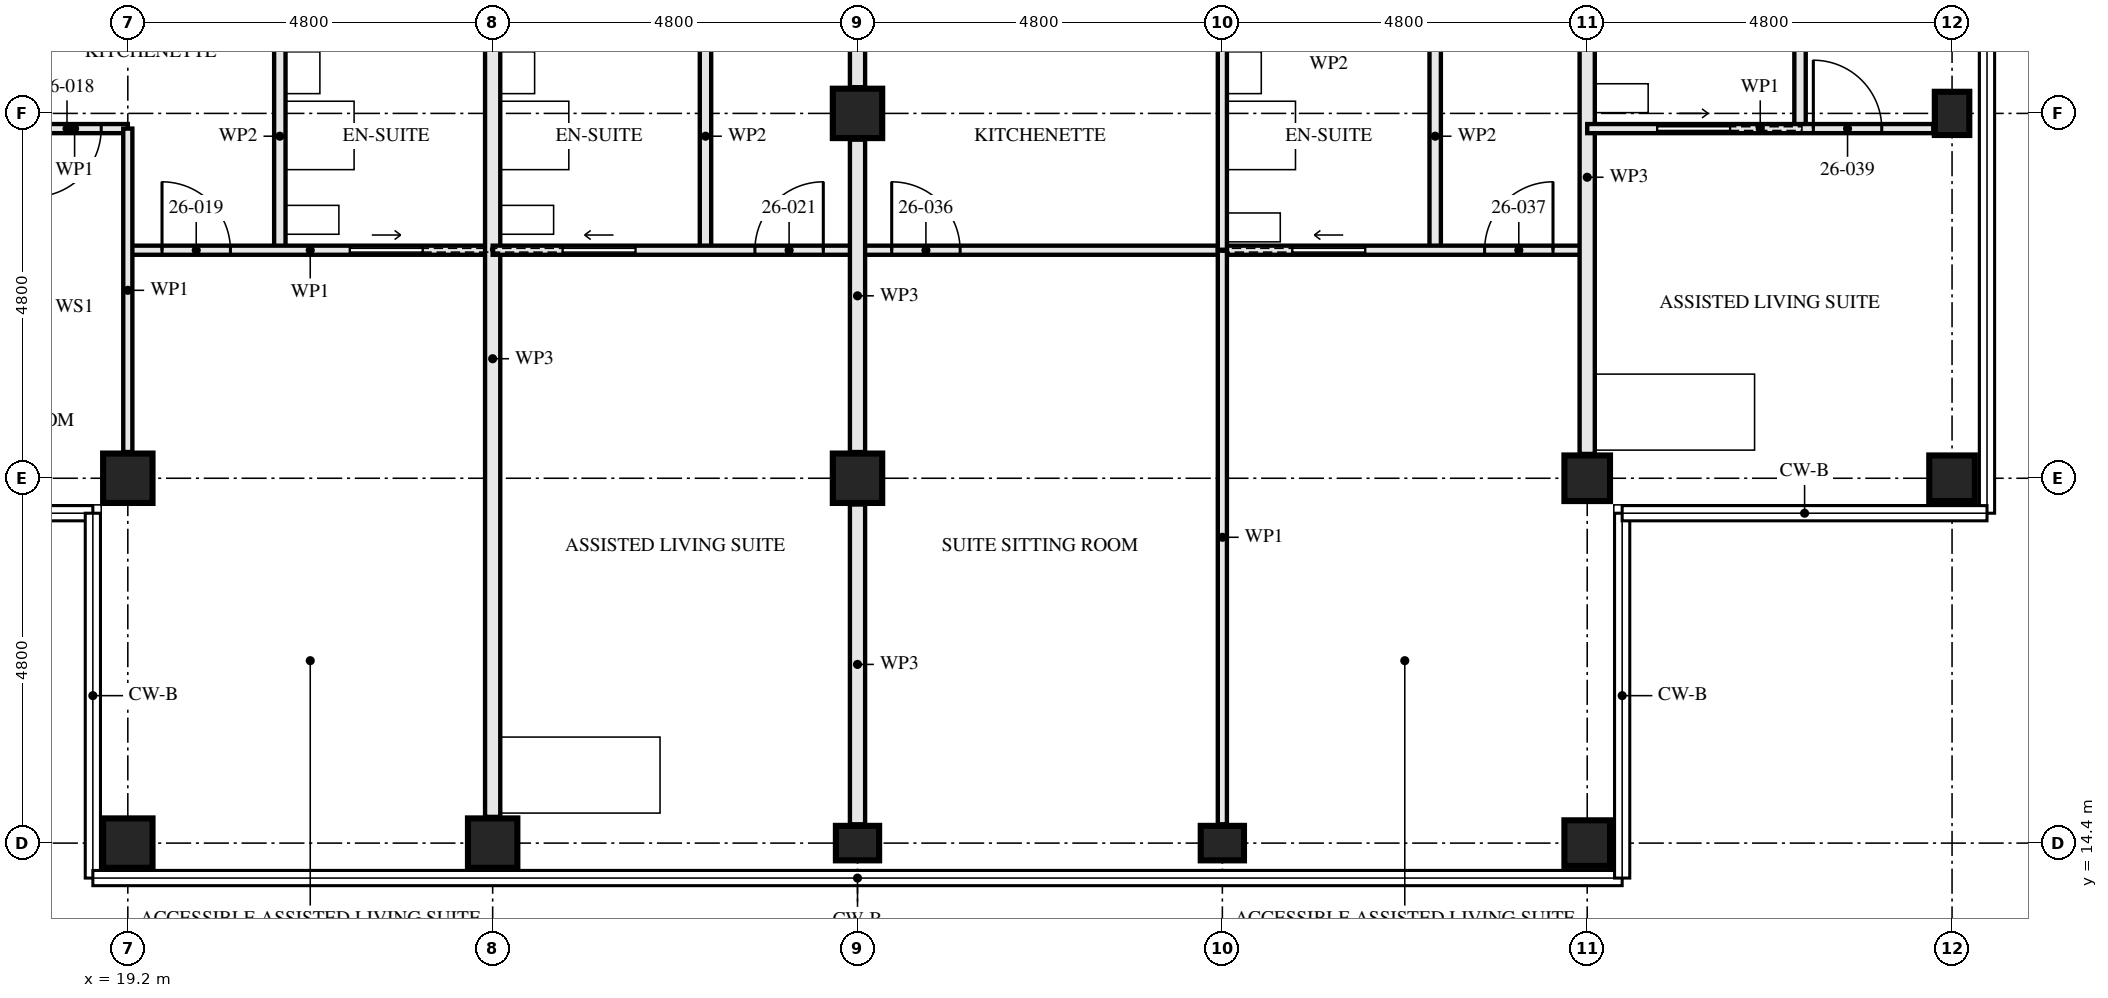
"""IFC4 building model, lengths in metres.
Left out: names, types, materials, properties, quantities, classifications, styles, units other than length and angle.
Written with IfcOpenShell. Run it as: python <this file> out.ifc"""

import sys

from ifc_helpers import new_model, si_unit, direction, frame, frame_2d, origin, origin_2d, place, context, subcontext, project, spatial, rectangle, hollow_rectangle, i_section, extrude, element, fill, save


model = new_model("IFC4")
c1 = context("Model", 3, precision=1e-05, world=origin(), true_north=direction((0.0, 1.0)))
c2 = subcontext(c1, "Body", "Model", "MODEL_VIEW")
j1 = project(units=[si_unit("LENGTHUNIT", "METRE"), si_unit("PLANEANGLEUNIT", "RADIAN")], contexts=[c1])
p1 = place(None, origin())
s1 = spatial("IfcSite", under=j1, at=p1, CompositionType="ELEMENT")
p2 = place(p1, origin())
s2 = spatial("IfcBuilding", under=s1, at=p2, CompositionType="ELEMENT")
p3 = place(p2, frame((0.0, 0.0, 98.0)))
s3 = spatial("IfcBuildingStorey", under=s2, at=p3, CompositionType="ELEMENT", Elevation=98.0)
for number, where, z_axis, x_axis in (
    (1, (19.2, 14.4, 0.0), (0.0, 0.0, 1.0), (0.0, 1.0, 0.0)),
    (2, (19.2, 19.2, 0.0), (0.0, 0.0, 1.0), (0.0, 1.0, 0.0)),
    (3, (24.0, 14.4, 0.0), (0.0, 0.0, 1.0), (0.0, 1.0, 0.0)),
):
    element("IfcColumn", number, at=place(p3, frame(where, z_axis=z_axis, x_axis=x_axis)), inside=s3, PredefinedType="COLUMN", context=c2, shape_type="SweptSolid", body=[
        extrude(hollow_rectangle(XDim=0.65, YDim=0.65, WallThickness=0.08, at=origin_2d()), origin(), (0.0, 0.0, 1.0), 3.5),
    ])
p4 = place(p3, frame((28.8, 14.4, 0.0), z_axis=(0.0, 0.0, 1.0), x_axis=(0.0, 1.0, 0.0)))
e4 = element("IfcColumn", 4, at=p4, inside=s3, PredefinedType="COLUMN", context=c2, shape_type="SweptSolid", body=[
    extrude(i_section(OverallWidth=0.454, OverallDepth=0.569, WebThickness=0.078, FlangeThickness=0.125, FilletRadius=0.015, at=origin_2d()), origin(), (0.0, 0.0, 1.0), 3.5),
])
for number, where, z_axis, x_axis in (
    (5, (28.8, 19.2, 0.0), (0.0, 0.0, 1.0), (1.0, 0.0, 0.0)),
    (6, (28.8, 24.0, 0.0), (0.0, 0.0, 1.0), (1.0, 0.0, 0.0)),
):
    element("IfcColumn", number, at=place(p3, frame(where, z_axis=z_axis, x_axis=x_axis)), inside=s3, PredefinedType="COLUMN", context=c2, shape_type="SweptSolid", body=[
        extrude(hollow_rectangle(XDim=0.65, YDim=0.65, WallThickness=0.05, at=origin_2d()), origin(), (0.0, 0.0, 1.0), 3.5),
    ])
p5 = place(p3, frame((33.6, 14.4, 0.0), z_axis=(0.0, 0.0, 1.0), x_axis=(0.0, 1.0, 0.0)))
e7 = element("IfcColumn", 7, at=p5, inside=s3, PredefinedType="COLUMN", context=c2, shape_type="SweptSolid", body=[
    extrude(i_section(OverallWidth=0.454, OverallDepth=0.569, WebThickness=0.078, FlangeThickness=0.125, FilletRadius=0.015, at=origin_2d()), origin(), (0.0, 0.0, 1.0), 3.5),
])
for number, where, z_axis, x_axis in (
    (8, (38.4, 14.4, 0.0), (0.0, 0.0, 1.0), (0.0, 1.0, 0.0)),
    (9, (38.4, 19.2, 0.0), (0.0, 0.0, 1.0), (0.0, 1.0, 0.0)),
    (10, (43.2, 19.2, 0.0), (0.0, 0.0, 1.0), (0.0, 1.0, 0.0)),
):
    element("IfcColumn", number, at=place(p3, frame(where, z_axis=z_axis, x_axis=x_axis)), inside=s3, PredefinedType="COLUMN", context=c2, shape_type="SweptSolid", body=[
        extrude(hollow_rectangle(XDim=0.6, YDim=0.6, WallThickness=0.05, at=origin_2d()), origin(), (0.0, 0.0, 1.0), 3.5),
    ])
p6 = place(p3, frame((43.2, 24.0, 0.0), z_axis=(0.0, 0.0, 1.0), x_axis=(1.0, 0.0, 0.0)))
e11 = element("IfcColumn", 11, at=p6, inside=s3, PredefinedType="COLUMN", context=c2, shape_type="SweptSolid", body=[
    extrude(i_section(OverallWidth=0.454, OverallDepth=0.569, WebThickness=0.078, FlangeThickness=0.125, FilletRadius=0.015, at=origin_2d()), origin(), (0.0, 0.0, 1.0), 3.5),
])
p7 = place(p3, frame((21.2, 22.2, 0.0), z_axis=(0.0, 0.0, 1.0), x_axis=(0.0, 1.0, 0.0)))
e12 = element("IfcWall", 12, at=p7, inside=s3, PredefinedType="PARTITIONING", context=c2, shape_type="SweptSolid", body=[
    extrude(rectangle(XDim=3.0, YDim=0.15, at=frame_2d((1.5, 0.0))), origin(), (0.0, 0.0, 1.0), 2.55),
])
p8 = place(p3, frame((17.8, 23.8, 0.0), z_axis=(0.0, 0.0, 1.0), x_axis=(1.0, 0.0, 0.0)))
e13 = element("IfcWall", 13, at=p8, inside=s3, PredefinedType="PARTITIONING", context=c2, shape_type="SweptSolid", body=[
    extrude(rectangle(XDim=1.4, YDim=0.12, at=frame_2d((0.7, 0.0))), origin(), (0.0, 0.0, 1.0), 3.33),
])
p9 = place(p8, frame((0.15, 0.0, 0.0)))
e14 = element("IfcOpeningElement", 14, at=p9, cuts=e13, PredefinedType="OPENING", context=c2, shape_type="SweptSolid", body=[
    extrude(rectangle(XDim=0.9, YDim=2.1, at=frame_2d((0.45, 1.05))), frame((0.0, 0.071, 0.0), z_axis=(0.0, -1.0, 0.0), x_axis=(1.0, 0.0, 0.0)), (0.0, 0.0, 1.0), 0.141),
])
p10 = place(p3, frame((19.2, 22.2, 0.0), z_axis=(0.0, 0.0, 1.0), x_axis=(1.0, 0.0, 0.0)))
e15 = element("IfcWall", 15, at=p10, inside=s3, PredefinedType="PARTITIONING", context=c2, shape_type="SweptSolid", body=[
    extrude(rectangle(XDim=4.8, YDim=0.12, at=frame_2d((2.4, 0.0))), origin(), (0.0, 0.0, 1.0), 3.33),
])
p11 = place(p10, frame((0.45, 0.0, 0.0)))
e16 = element("IfcOpeningElement", 16, at=p11, cuts=e15, PredefinedType="OPENING", context=c2, shape_type="SweptSolid", body=[
    extrude(rectangle(XDim=0.9, YDim=2.1, at=frame_2d((0.45, 1.05))), frame((0.0, 0.071, 0.0), z_axis=(0.0, -1.0, 0.0), x_axis=(1.0, 0.0, 0.0)), (0.0, 0.0, 1.0), 0.141),
])
p12 = place(p10, frame((2.925, 0.0, 0.0)))
e17 = element("IfcOpeningElement", 17, at=p12, cuts=e15, PredefinedType="OPENING", context=c2, shape_type="SweptSolid", body=[
    extrude(rectangle(XDim=0.95, YDim=2.1, at=frame_2d((0.475, 1.05))), frame((0.0, 0.071, 0.0), z_axis=(0.0, -1.0, 0.0), x_axis=(1.0, 0.0, 0.0)), (0.0, 0.0, 1.0), 0.141),
])
p13 = place(p3, frame((19.2, 19.545, 0.0), z_axis=(0.0, 0.0, 1.0), x_axis=(0.0, 1.0, 0.0)))
e18 = element("IfcWall", 18, at=p13, inside=s3, PredefinedType="PARTITIONING", context=c2, shape_type="SweptSolid", body=[
    extrude(rectangle(XDim=4.255, YDim=0.12, at=frame_2d((2.127, 0.0))), origin(), (0.0, 0.0, 1.0), 2.55),
])
p14 = place(p3, frame((24.0, 14.745, 0.0), z_axis=(0.0, 0.0, 1.0), x_axis=(0.0, 1.0, 0.0)))
e19 = element("IfcWall", 19, at=p14, inside=s3, PredefinedType="PARTITIONING", context=c2, shape_type="SweptSolid", body=[
    extrude(rectangle(XDim=12.055, YDim=0.2, at=frame_2d((6.027, 0.0))), origin(), (0.0, 0.0, 1.0), 2.55),
])
p15 = place(p3, frame((26.8, 22.2, 0.0), z_axis=(0.0, 0.0, 1.0), x_axis=(0.0, 1.0, 0.0)))
e20 = element("IfcWall", 20, at=p15, inside=s3, PredefinedType="PARTITIONING", context=c2, shape_type="SweptSolid", body=[
    extrude(rectangle(XDim=3.0, YDim=0.15, at=frame_2d((1.5, 0.0))), origin(), (0.0, 0.0, 1.0), 2.55),
])
p16 = place(p3, frame((24.0, 22.2, 0.0), z_axis=(0.0, 0.0, 1.0), x_axis=(1.0, 0.0, 0.0)))
e21 = element("IfcWall", 21, at=p16, inside=s3, PredefinedType="PARTITIONING", context=c2, shape_type="SweptSolid", body=[
    extrude(rectangle(XDim=4.8, YDim=0.12, at=frame_2d((2.4, 0.0))), origin(), (0.0, 0.0, 1.0), 3.33),
])
p17 = place(p16, frame((3.45, 0.0, 0.0)))
e22 = element("IfcOpeningElement", 22, at=p17, cuts=e21, PredefinedType="OPENING", context=c2, shape_type="SweptSolid", body=[
    extrude(rectangle(XDim=0.9, YDim=2.1, at=frame_2d((0.45, 1.05))), frame((0.0, 0.071, 0.0), z_axis=(0.0, -1.0, 0.0), x_axis=(1.0, 0.0, 0.0)), (0.0, 0.0, 1.0), 0.141),
])
p18 = place(p16, frame((0.925, 0.0, 0.0)))
e23 = element("IfcOpeningElement", 23, at=p18, cuts=e21, PredefinedType="OPENING", context=c2, shape_type="SweptSolid", body=[
    extrude(rectangle(XDim=0.95, YDim=2.1, at=frame_2d((0.475, 1.05))), frame((0.0, 0.071, 0.0), z_axis=(0.0, -1.0, 0.0), x_axis=(1.0, 0.0, 0.0)), (0.0, 0.0, 1.0), 0.141),
])
p19 = place(p3, frame((36.4, 22.2, 0.0), z_axis=(0.0, 0.0, 1.0), x_axis=(0.0, 1.0, 0.0)))
e24 = element("IfcWall", 24, at=p19, inside=s3, PredefinedType="PARTITIONING", context=c2, shape_type="SweptSolid", body=[
    extrude(rectangle(XDim=3.0, YDim=0.15, at=frame_2d((1.5, 0.0))), origin(), (0.0, 0.0, 1.0), 2.55),
])
p20 = place(p3, frame((33.6, 22.2, 0.0), z_axis=(0.0, 0.0, 1.0), x_axis=(0.0, 1.0, 0.0)))
e25 = element("IfcWall", 25, at=p20, inside=s3, PredefinedType="PARTITIONING", context=c2, shape_type="SweptSolid", body=[
    extrude(rectangle(XDim=4.65, YDim=0.12, at=frame_2d((2.325, 0.0))), origin(), (0.0, 0.0, 1.0), 2.55),
])
p21 = place(p20, frame((3.35, 0.0, 0.0)))
e26 = element("IfcOpeningElement", 26, at=p21, cuts=e25, PredefinedType="OPENING", context=c2, shape_type="SweptSolid", body=[
    extrude(rectangle(XDim=0.9, YDim=2.1, at=frame_2d((0.45, 1.05))), frame((0.0, 0.071, 0.0), z_axis=(0.0, -1.0, 0.0), x_axis=(1.0, 0.0, 0.0)), (0.0, 0.0, 1.0), 0.141),
])
p22 = place(p3, frame((28.8, 22.2, 0.0), z_axis=(0.0, 0.0, 1.0), x_axis=(1.0, 0.0, 0.0)))
e27 = element("IfcWall", 27, at=p22, inside=s3, PredefinedType="PARTITIONING", context=c2, shape_type="SweptSolid", body=[
    extrude(rectangle(XDim=4.8, YDim=0.12, at=frame_2d((2.4, 0.0))), origin(), (0.0, 0.0, 1.0), 3.33),
])
p23 = place(p22, frame((0.45, 0.0, 0.0)))
e28 = element("IfcOpeningElement", 28, at=p23, cuts=e27, PredefinedType="OPENING", context=c2, shape_type="SweptSolid", body=[
    extrude(rectangle(XDim=0.9, YDim=2.1, at=frame_2d((0.45, 1.05))), frame((0.0, 0.071, 0.0), z_axis=(0.0, -1.0, 0.0), x_axis=(1.0, 0.0, 0.0)), (0.0, 0.0, 1.0), 0.141),
])
p24 = place(p3, frame((33.6, 22.2, 0.0), z_axis=(0.0, 0.0, 1.0), x_axis=(1.0, 0.0, 0.0)))
e29 = element("IfcWall", 29, at=p24, inside=s3, PredefinedType="PARTITIONING", context=c2, shape_type="SweptSolid", body=[
    extrude(rectangle(XDim=4.8, YDim=0.12, at=frame_2d((2.4, 0.0))), origin(), (0.0, 0.0, 1.0), 3.33),
])
p25 = place(p24, frame((3.45, 0.0, 0.0)))
e30 = element("IfcOpeningElement", 30, at=p25, cuts=e29, PredefinedType="OPENING", context=c2, shape_type="SweptSolid", body=[
    extrude(rectangle(XDim=0.9, YDim=2.1, at=frame_2d((0.45, 1.05))), frame((0.0, 0.071, 0.0), z_axis=(0.0, -1.0, 0.0), x_axis=(1.0, 0.0, 0.0)), (0.0, 0.0, 1.0), 0.141),
])
p26 = place(p24, frame((0.925, 0.0, 0.0)))
e31 = element("IfcOpeningElement", 31, at=p26, cuts=e29, PredefinedType="OPENING", context=c2, shape_type="SweptSolid", body=[
    extrude(rectangle(XDim=0.95, YDim=2.1, at=frame_2d((0.475, 1.05))), frame((0.0, 0.071, 0.0), z_axis=(0.0, -1.0, 0.0), x_axis=(1.0, 0.0, 0.0)), (0.0, 0.0, 1.0), 0.141),
])
p27 = place(p3, frame((33.6, 14.647, 0.0), z_axis=(0.0, 0.0, 1.0), x_axis=(0.0, 1.0, 0.0)))
e32 = element("IfcWall", 32, at=p27, inside=s3, PredefinedType="PARTITIONING", context=c2, shape_type="SweptSolid", body=[
    extrude(rectangle(XDim=7.553, YDim=0.12, at=frame_2d((3.776, 0.0))), origin(), (0.0, 0.0, 1.0), 2.55),
])
p28 = place(p3, frame((38.4, 19.52, 0.0), z_axis=(0.0, 0.0, 1.0), x_axis=(0.0, 1.0, 0.0)))
e33 = element("IfcWall", 33, at=p28, inside=s3, PredefinedType="PARTITIONING", context=c2, shape_type="SweptSolid", body=[
    extrude(rectangle(XDim=7.28, YDim=0.2, at=frame_2d((3.64, 0.0))), origin(), (0.0, 0.0, 1.0), 2.55),
])
p29 = place(p3, frame((41.2, 23.8, 0.0), z_axis=(0.0, 0.0, 1.0), x_axis=(0.0, 1.0, 0.0)))
e34 = element("IfcWall", 34, at=p29, inside=s3, PredefinedType="PARTITIONING", context=c2, shape_type="SweptSolid", body=[
    extrude(rectangle(XDim=3.0, YDim=0.15, at=frame_2d((1.5, 0.0))), origin(), (0.0, 0.0, 1.0), 2.55),
])
p30 = place(p3, frame((38.4, 23.8, 0.0), z_axis=(0.0, 0.0, 1.0), x_axis=(1.0, 0.0, 0.0)))
e35 = element("IfcWall", 35, at=p30, inside=s3, PredefinedType="PARTITIONING", context=c2, shape_type="SweptSolid", body=[
    extrude(rectangle(XDim=4.553, YDim=0.12, at=frame_2d((2.276, 0.0))), origin(), (0.0, 0.0, 1.0), 3.33),
])
p31 = place(p30, frame((2.975, 0.0, 0.0)))
e36 = element("IfcOpeningElement", 36, at=p31, cuts=e35, PredefinedType="OPENING", context=c2, shape_type="SweptSolid", body=[
    extrude(rectangle(XDim=0.9, YDim=2.1, at=frame_2d((0.45, 1.05))), frame((0.0, 0.071, 0.0), z_axis=(0.0, -1.0, 0.0), x_axis=(1.0, 0.0, 0.0)), (0.0, 0.0, 1.0), 0.141),
])
p32 = place(p30, frame((0.925, 0.0, 0.0)))
e37 = element("IfcOpeningElement", 37, at=p32, cuts=e35, PredefinedType="OPENING", context=c2, shape_type="SweptSolid", body=[
    extrude(rectangle(XDim=0.95, YDim=2.1, at=frame_2d((0.475, 1.05))), frame((0.0, 0.071, 0.0), z_axis=(0.0, -1.0, 0.0), x_axis=(1.0, 0.0, 0.0)), (0.0, 0.0, 1.0), 0.141),
])
p33 = place(p3, frame((28.8, 14.647, 0.0), z_axis=(0.0, 0.0, 1.0), x_axis=(0.0, 1.0, 0.0)))
e38 = element("IfcWall", 38, at=p33, inside=s3, PredefinedType="PARTITIONING", context=c2, shape_type="SweptSolid", body=[
    extrude(rectangle(XDim=4.208, YDim=0.2, at=frame_2d((2.104, 0.0))), origin(), (0.0, 0.0, 1.0), 2.32),
])
p34 = place(p3, frame((28.8, 19.545, 0.0), z_axis=(0.0, 0.0, 1.0), x_axis=(0.0, 1.0, 0.0)))
e39 = element("IfcWall", 39, at=p34, inside=s3, PredefinedType="PARTITIONING", context=c2, shape_type="SweptSolid", body=[
    extrude(rectangle(XDim=4.11, YDim=0.2, at=frame_2d((2.055, 0.0))), origin(), (0.0, 0.0, 1.0), 2.32),
])
p35 = place(p3, frame((28.8, 24.345, 0.0), z_axis=(0.0, 0.0, 1.0), x_axis=(0.0, 1.0, 0.0)))
e40 = element("IfcWall", 40, at=p35, inside=s3, PredefinedType="PARTITIONING", context=c2, shape_type="SweptSolid", body=[
    extrude(rectangle(XDim=2.555, YDim=0.2, at=frame_2d((1.277, 0.0))), origin(), (0.0, 0.0, 1.0), 2.32),
])
p36 = place(p9, frame((0.9, 0.0, 0.0), z_axis=(0.0, 0.0, 1.0), x_axis=(-1.0, 0.0, 0.0)))
e41 = element("IfcDoor", 41, at=p36, inside=s3, OperationType="SINGLE_SWING_LEFT", PredefinedType="DOOR", context=c2, shape_type="SweptSolid", body=[
    extrude(rectangle(XDim=0.9, YDim=2.1, at=frame_2d((0.45, 1.05))), frame((0.0, 0.022, 0.0), z_axis=(0.0, -1.0, 0.0), x_axis=(1.0, 0.0, 0.0)), (0.0, 0.0, 1.0), 0.044),
])
fill(e14, e41)
p37 = place(p11, origin())
e42 = element("IfcDoor", 42, at=p37, inside=s3, OperationType="SINGLE_SWING_RIGHT", PredefinedType="DOOR", context=c2, shape_type="SweptSolid", body=[
    extrude(rectangle(XDim=0.9, YDim=2.1, at=frame_2d((0.45, 1.05))), frame((0.0, 0.022, 0.0), z_axis=(0.0, -1.0, 0.0), x_axis=(1.0, 0.0, 0.0)), (0.0, 0.0, 1.0), 0.044),
])
fill(e16, e42)
p38 = place(p12, origin())
e43 = element("IfcDoor", 43, at=p38, inside=s3, OperationType="SLIDING_TO_LEFT", PredefinedType="DOOR", context=c2, shape_type="SweptSolid", body=[
    extrude(rectangle(XDim=0.95, YDim=2.1, at=frame_2d((0.475, 1.05))), frame((0.0, 0.022, 0.0), z_axis=(0.0, -1.0, 0.0), x_axis=(1.0, 0.0, 0.0)), (0.0, 0.0, 1.0), 0.044),
])
fill(e17, e43)
p39 = place(p17, origin())
e44 = element("IfcDoor", 44, at=p39, inside=s3, OperationType="SINGLE_SWING_LEFT", PredefinedType="DOOR", context=c2, shape_type="SweptSolid", body=[
    extrude(rectangle(XDim=0.9, YDim=2.1, at=frame_2d((0.45, 1.05))), frame((0.0, 0.022, 0.0), z_axis=(0.0, -1.0, 0.0), x_axis=(1.0, 0.0, 0.0)), (0.0, 0.0, 1.0), 0.044),
])
fill(e22, e44)
p40 = place(p18, origin())
e45 = element("IfcDoor", 45, at=p40, inside=s3, OperationType="SLIDING_TO_RIGHT", PredefinedType="DOOR", context=c2, shape_type="SweptSolid", body=[
    extrude(rectangle(XDim=0.95, YDim=2.1, at=frame_2d((0.475, 1.05))), frame((0.0, 0.022, 0.0), z_axis=(0.0, -1.0, 0.0), x_axis=(1.0, 0.0, 0.0)), (0.0, 0.0, 1.0), 0.044),
])
fill(e23, e45)
p41 = place(p23, origin())
e46 = element("IfcDoor", 46, at=p41, inside=s3, OperationType="SINGLE_SWING_RIGHT", PredefinedType="DOOR", context=c2, shape_type="SweptSolid", body=[
    extrude(rectangle(XDim=0.9, YDim=2.1, at=frame_2d((0.45, 1.05))), frame((0.0, 0.022, 0.0), z_axis=(0.0, -1.0, 0.0), x_axis=(1.0, 0.0, 0.0)), (0.0, 0.0, 1.0), 0.044),
])
fill(e28, e46)
p42 = place(p25, origin())
e47 = element("IfcDoor", 47, at=p42, inside=s3, OperationType="SINGLE_SWING_LEFT", PredefinedType="DOOR", context=c2, shape_type="SweptSolid", body=[
    extrude(rectangle(XDim=0.9, YDim=2.1, at=frame_2d((0.45, 1.05))), frame((0.0, 0.022, 0.0), z_axis=(0.0, -1.0, 0.0), x_axis=(1.0, 0.0, 0.0)), (0.0, 0.0, 1.0), 0.044),
])
fill(e30, e47)
p43 = place(p26, origin())
e48 = element("IfcDoor", 48, at=p43, inside=s3, OperationType="SLIDING_TO_RIGHT", PredefinedType="DOOR", context=c2, shape_type="SweptSolid", body=[
    extrude(rectangle(XDim=0.95, YDim=2.1, at=frame_2d((0.475, 1.05))), frame((0.0, 0.022, 0.0), z_axis=(0.0, -1.0, 0.0), x_axis=(1.0, 0.0, 0.0)), (0.0, 0.0, 1.0), 0.044),
])
fill(e31, e48)
p44 = place(p31, origin())
e49 = element("IfcDoor", 49, at=p44, inside=s3, OperationType="SINGLE_SWING_RIGHT", PredefinedType="DOOR", context=c2, shape_type="SweptSolid", body=[
    extrude(rectangle(XDim=0.9, YDim=2.1, at=frame_2d((0.45, 1.05))), frame((0.0, 0.022, 0.0), z_axis=(0.0, -1.0, 0.0), x_axis=(1.0, 0.0, 0.0)), (0.0, 0.0, 1.0), 0.044),
])
fill(e36, e49)
p45 = place(p32, origin())
e50 = element("IfcDoor", 50, at=p45, inside=s3, OperationType="SLIDING_TO_LEFT", PredefinedType="DOOR", context=c2, shape_type="SweptSolid", body=[
    extrude(rectangle(XDim=0.95, YDim=2.1, at=frame_2d((0.475, 1.05))), frame((0.0, 0.022, 0.0), z_axis=(0.0, -1.0, 0.0), x_axis=(1.0, 0.0, 0.0)), (0.0, 0.0, 1.0), 0.044),
])
fill(e37, e50)
save(model, sys.argv[1])
